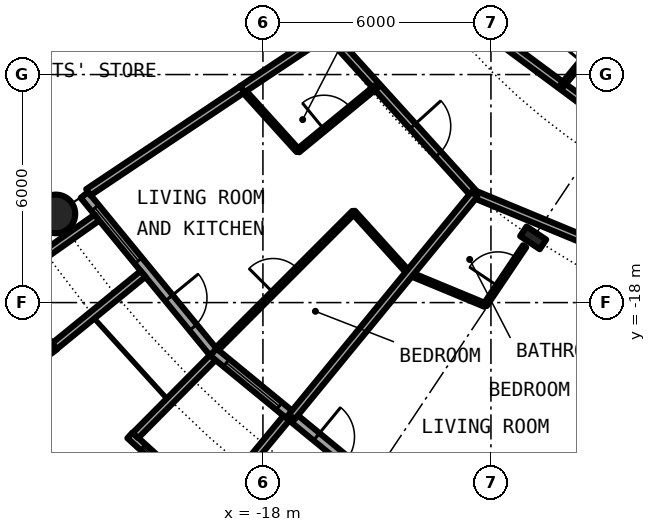
"""IFC4 building model, lengths in metres.
Left out: names, types, materials, properties, quantities, classifications, styles, units other than length and angle.
Written with IfcOpenShell. Run it as: python <this file> out.ifc"""

import sys

from ifc_helpers import new_model, si_unit, direction, frame, frame_2d, origin, origin_2d, place, context, subcontext, project, spatial, rectangle, circle, hollow_circle, i_section, extrude, element, fill, save


model = new_model("IFC4")
c1 = context("Model", 3, precision=1e-05, world=origin(), true_north=direction((0.0, 1.0)))
c2 = subcontext(c1, "Body", "Model", "MODEL_VIEW")
j1 = project(units=[si_unit("LENGTHUNIT", "METRE"), si_unit("PLANEANGLEUNIT", "RADIAN")], contexts=[c1])
p1 = place(None, origin())
s1 = spatial("IfcSite", under=j1, at=p1, CompositionType="ELEMENT")
p2 = place(p1, origin())
s2 = spatial("IfcBuilding", under=s1, at=p2, CompositionType="ELEMENT")
p3 = place(p2, frame((0.0, 0.0, 47.2)))
s3 = spatial("IfcBuildingStorey", under=s2, at=p3, CompositionType="ELEMENT", Elevation=47.2)
p4 = place(p3, frame((-23.448, -15.667, 0.0), z_axis=(0.0, 0.0, 1.0), x_axis=(1.0, 0.0, 0.0)))
e1 = element("IfcColumn", 1, at=p4, inside=s3, PredefinedType="COLUMN", context=c2, shape_type="SweptSolid", body=[
    extrude(hollow_circle(Radius=0.508, WallThickness=0.05, at=origin_2d()), origin(), (0.0, 0.0, 1.0), 3.05),
])
p5 = place(p3, frame((-10.889, -16.297, 0.0), z_axis=(0.0, 0.0, 1.0), x_axis=(-0.55557023302, -0.831469612303, 0.0)))
e2 = element("IfcColumn", 2, at=p5, inside=s3, PredefinedType="COLUMN", context=c2, shape_type="SweptSolid", body=[
    extrude(i_section(OverallWidth=0.305, OverallDepth=0.62, WebThickness=0.021, FlangeThickness=0.04, FilletRadius=0.027, at=origin_2d()), origin(), (0.0, 0.0, 1.0), 3.05),
])
p6 = place(p3, frame((-22.699, -15.167, 0.0), z_axis=(0.0, 0.0, 1.0), x_axis=(0.634382322723, -0.773019449054, 0.0)))
e3 = element("IfcWall", 3, at=p6, inside=s3, PredefinedType="SOLIDWALL", context=c2, shape_type="SweptSolid", body=[
    extrude(rectangle(XDim=5.352, YDim=0.25, at=frame_2d((2.676, 0.0))), origin(), (0.0, 0.0, 1.0), 2.7),
])
p7 = place(p6, frame((0.441, 0.0, 0.3)))
e4 = element("IfcOpeningElement", 4, at=p7, cuts=e3, PredefinedType="OPENING", context=c2, shape_type="SweptSolid", body=[
    extrude(rectangle(XDim=1.8, YDim=2.1, at=frame_2d((0.9, 1.05))), frame((0.0, 0.135, 0.0), z_axis=(0.0, -1.0, 0.0), x_axis=(1.0, 0.0, 0.0)), (0.0, 0.0, 1.0), 0.27),
])
p8 = place(p6, frame((3.51, 0.0, 0.0)))
e5 = element("IfcOpeningElement", 5, at=p8, cuts=e3, PredefinedType="OPENING", context=c2, shape_type="SweptSolid", body=[
    extrude(rectangle(XDim=1.0, YDim=2.2, at=frame_2d((0.5, 1.1))), frame((0.0, 0.135, 0.0), z_axis=(0.0, -1.0, 0.0), x_axis=(1.0, 0.0, 0.0)), (0.0, 0.0, 1.0), 0.27),
])
p9 = place(p3, frame((-24.909, -17.427, -0.03), z_axis=(0.0, 0.0, 1.0), x_axis=(0.60418752353, -0.796842165306, 0.0)))
e6 = element("IfcWall", 6, at=p9, inside=s3, PredefinedType="SOLIDWALL", context=c2, shape_type="SweptSolid", body=[
    extrude(rectangle(XDim=2.337, YDim=0.2, at=frame_2d((1.168, 0.0))), origin(), (0.0, 0.0, 1.0), 2.73),
])
p10 = place(p9, frame((0.128, 0.0, 0.33)))
e7 = element("IfcOpeningElement", 7, at=p10, cuts=e6, PredefinedType="OPENING", context=c2, shape_type="SweptSolid", body=[
    extrude(circle(Radius=1.04, at=frame_2d((1.04, 1.04))), frame((0.0, 0.11, 0.0), z_axis=(0.0, -1.0, 0.0), x_axis=(1.0, 0.0, 0.0)), (0.0, 0.0, 1.0), 0.22),
])
p11 = place(p3, frame((-22.37, -15.765, -0.03), z_axis=(0.0, 0.0, 1.0), x_axis=(-0.817256123454, -0.576274612209, 0.0)))
e8 = element("IfcWall", 8, at=p11, inside=s3, PredefinedType="SOLIDWALL", context=c2, shape_type="SweptSolid", body=[
    extrude(rectangle(XDim=2.933, YDim=0.2, at=frame_2d((1.466, 0.0))), origin(), (0.0, 0.0, 1.0), 2.73),
])
p12 = place(p3, frame((-21.155, -17.246, -0.03), z_axis=(0.0, 0.0, 1.0), x_axis=(-0.775179004516, -0.631741648902, 0.0)))
e9 = element("IfcWall", 9, at=p12, inside=s3, PredefinedType="SOLIDWALL", context=c2, shape_type="SweptSolid", body=[
    extrude(rectangle(XDim=3.006, YDim=0.2, at=frame_2d((1.503, 0.0))), origin(), (0.0, 0.0, 1.0), 2.73),
])
p13 = place(p3, frame((-19.304, -19.304, 0.0), z_axis=(0.0, 0.0, 1.0), x_axis=(0.773019449054, -0.634382322723, 0.0)))
e10 = element("IfcWall", 10, at=p13, inside=s3, PredefinedType="SOLIDWALL", context=c2, shape_type="SweptSolid", body=[
    extrude(rectangle(XDim=5.352, YDim=0.25, at=frame_2d((2.676, 0.0))), origin(), (0.0, 0.0, 1.0), 2.7),
])
p14 = place(p13, frame((0.441, 0.0, 0.3)))
e11 = element("IfcOpeningElement", 11, at=p14, cuts=e10, PredefinedType="OPENING", context=c2, shape_type="SweptSolid", body=[
    extrude(rectangle(XDim=1.8, YDim=2.1, at=frame_2d((0.9, 1.05))), frame((0.0, 0.135, 0.0), z_axis=(0.0, -1.0, 0.0), x_axis=(1.0, 0.0, 0.0)), (0.0, 0.0, 1.0), 0.27),
])
p15 = place(p13, frame((3.51, 0.0, 0.0)))
e12 = element("IfcOpeningElement", 12, at=p15, cuts=e10, PredefinedType="OPENING", context=c2, shape_type="SweptSolid", body=[
    extrude(rectangle(XDim=1.0, YDim=2.2, at=frame_2d((0.5, 1.1))), frame((0.0, 0.135, 0.0), z_axis=(0.0, -1.0, 0.0), x_axis=(1.0, 0.0, 0.0)), (0.0, 0.0, 1.0), 0.27),
])
p16 = place(p3, frame((-21.5, -21.493, -0.03), z_axis=(0.0, 0.0, 1.0), x_axis=(0.740998365753, -0.671506829416, 0.0)))
e13 = element("IfcWall", 13, at=p16, inside=s3, PredefinedType="SOLIDWALL", context=c2, shape_type="SweptSolid", body=[
    extrude(rectangle(XDim=2.993, YDim=0.2, at=frame_2d((1.497, 0.0))), origin(), (0.0, 0.0, 1.0), 2.73),
])
p17 = place(p16, frame((0.457, 0.0, 0.33)))
e14 = element("IfcOpeningElement", 14, at=p17, cuts=e13, PredefinedType="OPENING", context=c2, shape_type="SweptSolid", body=[
    extrude(circle(Radius=1.04, at=frame_2d((1.04, 1.04))), frame((0.0, 0.11, 0.0), z_axis=(0.0, -1.0, 0.0), x_axis=(1.0, 0.0, 0.0)), (0.0, 0.0, 1.0), 0.22),
])
p18 = place(p3, frame((-19.323, -19.45, -0.03), z_axis=(0.0, 0.0, 1.0), x_axis=(-0.704476739375, -0.709727076896, 0.0)))
e15 = element("IfcWall", 15, at=p18, inside=s3, PredefinedType="SOLIDWALL", context=c2, shape_type="SweptSolid", body=[
    extrude(rectangle(XDim=2.883, YDim=0.2, at=frame_2d((1.441, 0.0))), origin(), (0.0, 0.0, 1.0), 2.73),
])
p19 = place(p3, frame((-17.384, -21.041, -0.03), z_axis=(0.0, 0.0, 1.0), x_axis=(-0.63709551667, -0.770784861449, 0.0)))
e16 = element("IfcWall", 16, at=p19, inside=s3, PredefinedType="SOLIDWALL", context=c2, shape_type="SweptSolid", body=[
    extrude(rectangle(XDim=3.006, YDim=0.2, at=frame_2d((1.503, 0.0))), origin(), (0.0, 0.0, 1.0), 2.73),
])
p20 = place(p3, frame((-18.542, -12.389, 0.0), z_axis=(0.0, 0.0, 1.0), x_axis=(0.671396556615, -0.741098282123, 0.0)))
e17 = element("IfcWall", 17, at=p20, inside=s3, PredefinedType="PARTITIONING", context=c2, shape_type="SweptSolid", body=[
    extrude(rectangle(XDim=2.182, YDim=0.1, at=frame_2d((1.091, 0.0))), origin(), (0.0, 0.0, 1.0), 2.7),
])
p21 = place(p3, frame((-15.617, -15.617, 0.0), z_axis=(0.0, 0.0, 1.0), x_axis=(0.671144831591, -0.741326254107, 0.0)))
e18 = element("IfcWall", 18, at=p21, inside=s3, PredefinedType="PARTITIONING", context=c2, shape_type="SweptSolid", body=[
    extrude(rectangle(XDim=2.181, YDim=0.1, at=frame_2d((1.091, 0.0))), origin(), (0.0, 0.0, 1.0), 2.7),
])
p22 = place(p3, frame((-14.147, -17.238, 0.0), z_axis=(0.0, 0.0, 1.0), x_axis=(0.923874819588, -0.382694810171, 0.0)))
e19 = element("IfcWall", 19, at=p22, inside=s3, PredefinedType="PARTITIONING", context=c2, shape_type="SweptSolid", body=[
    extrude(rectangle(XDim=2.158, YDim=0.1, at=frame_2d((1.079, 0.0))), origin(), (0.0, 0.0, 1.0), 2.7),
])
p23 = place(p3, frame((-16.193, -11.003, 0.0), z_axis=(0.0, 0.0, 1.0), x_axis=(0.671514934772, -0.740991020444, 0.0)))
e20 = element("IfcWall", 20, at=p23, inside=s3, PredefinedType="PARTITIONING", context=c2, shape_type="SweptSolid", body=[
    extrude(rectangle(XDim=5.598, YDim=0.2, at=frame_2d((2.799, 0.0))), origin(), (0.0, 0.0, 1.0), 2.38),
])
p24 = place(p23, frame((3.18, 0.0, 0.0)))
e21 = element("IfcOpeningElement", 21, at=p24, cuts=e20, PredefinedType="OPENING", context=c2, shape_type="SweptSolid", body=[
    extrude(rectangle(XDim=1.0, YDim=2.3, at=frame_2d((0.5, 1.15))), frame((0.0, 0.11, 0.0), z_axis=(0.0, -1.0, 0.0), x_axis=(1.0, 0.0, 0.0)), (0.0, 0.0, 1.0), 0.22),
])
p25 = place(p3, frame((-12.434, -15.151, 0.0), z_axis=(0.0, 0.0, 1.0), x_axis=(0.923888467236, -0.382661861319, 0.0)))
e22 = element("IfcWall", 22, at=p25, inside=s3, PredefinedType="PARTITIONING", context=c2, shape_type="SweptSolid", body=[
    extrude(rectangle(XDim=11.381, YDim=0.2, at=frame_2d((5.691, 0.0))), origin(), (0.0, 0.0, 1.0), 2.7),
])
p26 = place(p25, frame((3.292, 0.0, 0.0)))
e23 = element("IfcOpeningElement", 23, at=p26, cuts=e22, PredefinedType="OPENING", context=c2, shape_type="SweptSolid", body=[
    extrude(rectangle(XDim=1.0, YDim=2.3, at=frame_2d((0.5, 1.15))), frame((0.0, 0.11, 0.0), z_axis=(0.0, -1.0, 0.0), x_axis=(1.0, 0.0, 0.0)), (0.0, 0.0, 1.0), 0.22),
])
p27 = place(p3, frame((-14.037, -9.4, 0.0), z_axis=(0.0, 0.0, 1.0), x_axis=(0.803202106898, -0.595706618626, 0.0)))
e24 = element("IfcWall", 24, at=p27, inside=s3, PredefinedType="PARTITIONING", context=c2, shape_type="SweptSolid", body=[
    extrude(rectangle(XDim=11.368, YDim=0.2, at=frame_2d((5.684, 0.0))), origin(), (0.0, 0.0, 1.0), 2.7),
])
p28 = place(p27, frame((5.988, 0.0, 0.0)))
e25 = element("IfcOpeningElement", 25, at=p28, cuts=e24, PredefinedType="OPENING", context=c2, shape_type="SweptSolid", body=[
    extrude(rectangle(XDim=1.0, YDim=2.3, at=frame_2d((0.5, 1.15))), frame((0.0, 0.11, 0.0), z_axis=(0.0, -1.0, 0.0), x_axis=(1.0, 0.0, 0.0)), (0.0, 0.0, 1.0), 0.22),
])
p29 = place(p3, frame((-18.544, -12.387, 0.0), z_axis=(0.0, 0.0, 1.0), x_axis=(0.832066006555, 0.554676627176, 0.0)))
e26 = element("IfcWall", 26, at=p29, inside=s3, PredefinedType="PARTITIONING", context=c2, shape_type="SweptSolid", body=[
    extrude(rectangle(XDim=2.39, YDim=0.2, at=frame_2d((1.195, 0.0))), origin(), (0.0, 0.0, 1.0), 2.7),
])
p30 = place(p3, frame((-22.595, -15.098, 0.0), z_axis=(0.0, 0.0, 1.0), x_axis=(0.831387096605, 0.55569370664, 0.0)))
e27 = element("IfcWall", 27, at=p30, inside=s3, PredefinedType="PARTITIONING", context=c2, shape_type="SweptSolid", body=[
    extrude(rectangle(XDim=4.875, YDim=0.2, at=frame_2d((2.438, 0.0))), origin(), (0.0, 0.0, 1.0), 2.7),
])
p31 = place(p3, frame((-19.21, -19.222, 0.0), z_axis=(0.0, 0.0, 1.0), x_axis=(0.706914880313, 0.707298629994, 0.0)))
e28 = element("IfcWall", 28, at=p31, inside=s3, PredefinedType="PARTITIONING", context=c2, shape_type="SweptSolid", body=[
    extrude(rectangle(XDim=5.09, YDim=0.1, at=frame_2d((2.545, 0.0))), origin(), (0.0, 0.0, 1.0), 2.7),
])
p32 = place(p31, frame((2.095, 0.0, 0.0)))
e29 = element("IfcOpeningElement", 29, at=p32, cuts=e28, PredefinedType="OPENING", context=c2, shape_type="SweptSolid", body=[
    extrude(rectangle(XDim=0.9, YDim=2.3, at=frame_2d((0.45, 1.15))), frame((0.0, 0.06, 0.0), z_axis=(0.0, -1.0, 0.0), x_axis=(1.0, 0.0, 0.0)), (0.0, 0.0, 1.0), 0.12),
])
p33 = place(p3, frame((-17.241, -21.006, 0.0), z_axis=(0.0, 0.0, 1.0), x_axis=(0.634381303318, 0.773020285633, 0.0)))
e30 = element("IfcWall", 30, at=p33, inside=s3, PredefinedType="PARTITIONING", context=c2, shape_type="SweptSolid", body=[
    extrude(rectangle(XDim=7.576, YDim=0.2, at=frame_2d((3.788, 0.0))), origin(), (0.0, 0.0, 1.0), 2.7),
])
p34 = place(p3, frame((-17.077, -14.006, 0.0), z_axis=(0.0, 0.0, 1.0), x_axis=(0.77319617123, 0.634166918717, 0.0)))
e31 = element("IfcWall", 31, at=p34, inside=s3, PredefinedType="PARTITIONING", context=c2, shape_type="SweptSolid", body=[
    extrude(rectangle(XDim=2.675, YDim=0.1, at=frame_2d((1.337, 0.0))), origin(), (0.0, 0.0, 1.0), 2.7),
])
p35 = place(p34, frame((0.887, 0.0, 0.0)))
e32 = element("IfcOpeningElement", 32, at=p35, cuts=e31, PredefinedType="OPENING", context=c2, shape_type="SweptSolid", body=[
    extrude(rectangle(XDim=0.9, YDim=2.3, at=frame_2d((0.45, 1.15))), frame((0.0, 0.06, 0.0), z_axis=(0.0, -1.0, 0.0), x_axis=(1.0, 0.0, 0.0)), (0.0, 0.0, 1.0), 0.12),
])
p36 = place(p3, frame((-12.153, -18.064, 0.0), z_axis=(0.0, 0.0, 1.0), x_axis=(0.558084773293, 0.829783939239, 0.0)))
e33 = element("IfcWall", 33, at=p36, inside=s3, PredefinedType="PARTITIONING", context=c2, shape_type="SweptSolid", body=[
    extrude(rectangle(XDim=1.862, YDim=0.1, at=frame_2d((0.931, 0.0))), origin(), (0.0, 0.0, 1.0), 2.7),
])
p37 = place(p36, frame((0.6, 0.0, 0.0)))
e34 = element("IfcOpeningElement", 34, at=p37, cuts=e33, PredefinedType="OPENING", context=c2, shape_type="SweptSolid", body=[
    extrude(rectangle(XDim=0.9, YDim=2.3, at=frame_2d((0.45, 1.15))), frame((0.0, 0.06, 0.0), z_axis=(0.0, -1.0, 0.0), x_axis=(1.0, 0.0, 0.0)), (0.0, 0.0, 1.0), 0.12),
])
p38 = place(p3, frame((-10.399, -25.106, 0.0), z_axis=(0.0, 0.0, 1.0), x_axis=(0.382697543868, 0.923873687209, 0.0)))
e35 = element("IfcWall", 35, at=p38, inside=s3, PredefinedType="PARTITIONING", context=c2, shape_type="SweptSolid", body=[
    extrude(rectangle(XDim=8.419, YDim=0.1, at=frame_2d((4.209, 0.0))), origin(), (0.0, 0.0, 1.0), 2.7),
])
p39 = place(p38, frame((6.677, 0.0, 0.0)))
e36 = element("IfcOpeningElement", 36, at=p39, cuts=e35, PredefinedType="OPENING", context=c2, shape_type="SweptSolid", body=[
    extrude(rectangle(XDim=0.9, YDim=2.3, at=frame_2d((0.45, 1.15))), frame((0.0, 0.06, 0.0), z_axis=(0.0, -1.0, 0.0), x_axis=(1.0, 0.0, 0.0)), (0.0, 0.0, 1.0), 0.12),
])
p40 = place(p38, frame((2.468, 0.0, 0.0)))
e37 = element("IfcOpeningElement", 37, at=p40, cuts=e35, PredefinedType="OPENING", context=c2, shape_type="SweptSolid", body=[
    extrude(rectangle(XDim=0.9, YDim=2.3, at=frame_2d((0.45, 1.15))), frame((0.0, 0.06, 0.0), z_axis=(0.0, -1.0, 0.0), x_axis=(1.0, 0.0, 0.0)), (0.0, 0.0, 1.0), 0.12),
])
p41 = place(p3, frame((-10.132, -12.296, 0.0), z_axis=(0.0, 0.0, 1.0), x_axis=(0.636105207978, 0.771602335652, 0.0)))
e38 = element("IfcWall", 38, at=p41, inside=s3, PredefinedType="PARTITIONING", context=c2, shape_type="SweptSolid", body=[
    extrude(rectangle(XDim=8.213, YDim=0.1, at=frame_2d((4.106, 0.0))), origin(), (0.0, 0.0, 1.0), 2.7),
])
p42 = place(p41, frame((0.821, 0.0, 0.0)))
e39 = element("IfcOpeningElement", 39, at=p42, cuts=e38, PredefinedType="OPENING", context=c2, shape_type="SweptSolid", body=[
    extrude(rectangle(XDim=0.9, YDim=2.3, at=frame_2d((0.45, 1.15))), frame((0.0, 0.06, 0.0), z_axis=(0.0, -1.0, 0.0), x_axis=(1.0, 0.0, 0.0)), (0.0, 0.0, 1.0), 0.12),
])
p43 = place(p41, frame((4.929, 0.0, 0.0)))
e40 = element("IfcOpeningElement", 40, at=p43, cuts=e38, PredefinedType="OPENING", context=c2, shape_type="SweptSolid", body=[
    extrude(rectangle(XDim=0.9, YDim=2.3, at=frame_2d((0.45, 1.15))), frame((0.0, 0.06, 0.0), z_axis=(0.0, -1.0, 0.0), x_axis=(1.0, 0.0, 0.0)), (0.0, 0.0, 1.0), 0.12),
])
p44 = place(p7, origin())
e41 = element("IfcWindow", 41, at=p44, inside=s3, PartitioningType="SINGLE_PANEL", PredefinedType="WINDOW", context=c2, shape_type="SweptSolid", body=[
    extrude(rectangle(XDim=1.8, YDim=2.1, at=frame_2d((0.9, 1.05))), frame((0.0, 0.03, 0.0), z_axis=(0.0, -1.0, 0.0), x_axis=(1.0, 0.0, 0.0)), (0.0, 0.0, 1.0), 0.06),
])
fill(e4, e41)
p45 = place(p8, origin())
e42 = element("IfcDoor", 42, at=p45, inside=s3, OperationType="SINGLE_SWING_LEFT", PredefinedType="DOOR", context=c2, shape_type="SweptSolid", body=[
    extrude(rectangle(XDim=1.0, YDim=2.2, at=frame_2d((0.5, 1.1))), frame((0.0, 0.025, 0.0), z_axis=(0.0, -1.0, 0.0), x_axis=(1.0, 0.0, 0.0)), (0.0, 0.0, 1.0), 0.05),
])
fill(e5, e42)
p46 = place(p14, origin())
e43 = element("IfcWindow", 43, at=p46, inside=s3, PartitioningType="SINGLE_PANEL", PredefinedType="WINDOW", context=c2, shape_type="SweptSolid", body=[
    extrude(rectangle(XDim=1.8, YDim=2.1, at=frame_2d((0.9, 1.05))), frame((0.0, 0.03, 0.0), z_axis=(0.0, -1.0, 0.0), x_axis=(1.0, 0.0, 0.0)), (0.0, 0.0, 1.0), 0.06),
])
fill(e11, e43)
p47 = place(p17, origin())
e44 = element("IfcWindow", 44, at=p47, inside=s3, PartitioningType="SINGLE_PANEL", PredefinedType="WINDOW", context=c2, shape_type="SweptSolid", body=[
    extrude(circle(Radius=1.04, at=frame_2d((1.04, 1.04))), frame((0.0, 0.03, 0.0), z_axis=(0.0, -1.0, 0.0), x_axis=(1.0, 0.0, 0.0)), (0.0, 0.0, 1.0), 0.06),
])
fill(e14, e44)
p48 = place(p15, origin())
e45 = element("IfcDoor", 45, at=p48, inside=s3, OperationType="SINGLE_SWING_LEFT", PredefinedType="DOOR", context=c2, shape_type="SweptSolid", body=[
    extrude(rectangle(XDim=1.0, YDim=2.2, at=frame_2d((0.5, 1.1))), frame((0.0, 0.025, 0.0), z_axis=(0.0, -1.0, 0.0), x_axis=(1.0, 0.0, 0.0)), (0.0, 0.0, 1.0), 0.05),
])
fill(e12, e45)
p49 = place(p24, origin())
e46 = element("IfcDoor", 46, at=p49, inside=s3, OperationType="SINGLE_SWING_RIGHT", PredefinedType="DOOR", context=c2, shape_type="SweptSolid", body=[
    extrude(rectangle(XDim=1.0, YDim=2.3, at=frame_2d((0.5, 1.15))), frame((0.0, 0.025, 0.0), z_axis=(0.0, -1.0, 0.0), x_axis=(1.0, 0.0, 0.0)), (0.0, 0.0, 1.0), 0.05),
])
fill(e21, e46)
p50 = place(p35, origin())
e47 = element("IfcDoor", 47, at=p50, inside=s3, OperationType="SINGLE_SWING_LEFT", PredefinedType="DOOR", context=c2, shape_type="SweptSolid", body=[
    extrude(rectangle(XDim=0.9, YDim=2.3, at=frame_2d((0.45, 1.15))), frame((0.0, 0.025, 0.0), z_axis=(0.0, -1.0, 0.0), x_axis=(1.0, 0.0, 0.0)), (0.0, 0.0, 1.0), 0.05),
])
fill(e32, e47)
p51 = place(p32, origin())
e48 = element("IfcDoor", 48, at=p51, inside=s3, OperationType="SINGLE_SWING_RIGHT", PredefinedType="DOOR", context=c2, shape_type="SweptSolid", body=[
    extrude(rectangle(XDim=0.9, YDim=2.3, at=frame_2d((0.45, 1.15))), frame((0.0, 0.025, 0.0), z_axis=(0.0, -1.0, 0.0), x_axis=(1.0, 0.0, 0.0)), (0.0, 0.0, 1.0), 0.05),
])
fill(e29, e48)
p52 = place(p37, origin())
e49 = element("IfcDoor", 49, at=p52, inside=s3, OperationType="SINGLE_SWING_RIGHT", PredefinedType="DOOR", context=c2, shape_type="SweptSolid", body=[
    extrude(rectangle(XDim=0.9, YDim=2.3, at=frame_2d((0.45, 1.15))), frame((0.0, 0.025, 0.0), z_axis=(0.0, -1.0, 0.0), x_axis=(1.0, 0.0, 0.0)), (0.0, 0.0, 1.0), 0.05),
])
fill(e34, e49)
save(model, sys.argv[1])
